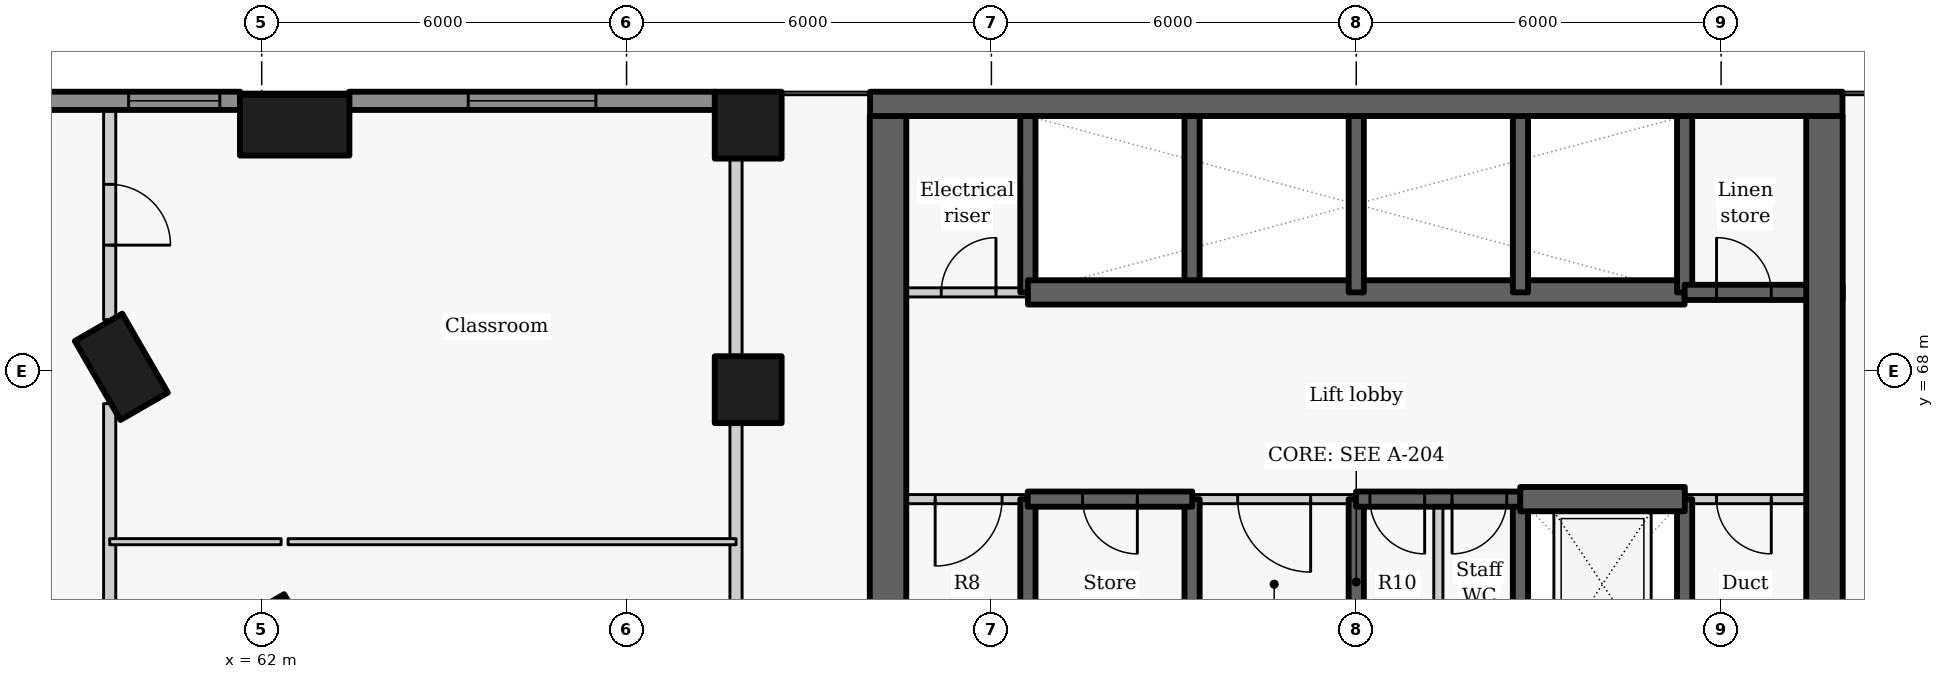
"""IFC4 building model, lengths in metres.
Left out: names, types, materials, properties, quantities, classifications, styles, units other than length and angle.
Written with IfcOpenShell. Run it as: python <this file> out.ifc"""

import sys

from ifc_helpers import new_model, si_unit, direction, frame, frame_2d, origin, origin_2d, place, context, subcontext, project, spatial, rectangle, extrude, element, fill, save


model = new_model("IFC4")
c1 = context("Model", 3, precision=1e-05, world=origin(), true_north=direction((0.0, 1.0)))
c2 = subcontext(c1, "Body", "Model", "MODEL_VIEW")
j1 = project(units=[si_unit("LENGTHUNIT", "METRE"), si_unit("PLANEANGLEUNIT", "RADIAN")], contexts=[c1])
p1 = place(None, origin())
s1 = spatial("IfcSite", under=j1, at=p1, CompositionType="ELEMENT")
p2 = place(p1, origin())
s2 = spatial("IfcBuilding", under=s1, at=p2, CompositionType="ELEMENT")
p3 = place(p2, frame((0.0, 0.0, 15.6)))
s3 = spatial("IfcBuildingStorey", under=s2, at=p3, CompositionType="ELEMENT", Elevation=15.6)
for number, where, z_axis, x_axis in (
    (1, (59.692, 68.075, 0.0), (0.0, 0.0, 1.0), (0.5, -0.866, 0.0)),
    (2, (62.354, 63.463, 0.0), (0.0, 0.0, 1.0), (0.5, -0.866, 0.0)),
):
    element("IfcColumn", number, at=place(p3, frame(where, z_axis=z_axis, x_axis=x_axis)), inside=s3, PredefinedType="COLUMN", context=c2, shape_type="SweptSolid", body=[
        extrude(rectangle(XDim=1.5, YDim=0.9, at=origin_2d()), origin(), (0.0, 0.0, 1.0), 4.2),
    ])
for number, where, z_axis, x_axis in (
    (3, (70.0, 72.05, 0.0), (0.0, 0.0, 1.0), (0.0, -1.0, 0.0)),
    (4, (70.0, 67.7, 0.0), (0.0, 0.0, 1.0), (0.0, -1.0, 0.0)),
):
    element("IfcColumn", number, at=place(p3, frame(where, z_axis=z_axis, x_axis=x_axis)), inside=s3, PredefinedType="COLUMN", context=c2, shape_type="SweptSolid", body=[
        extrude(rectangle(XDim=1.1, YDim=1.1, at=origin_2d()), origin(), (0.0, 0.0, 1.0), 4.2),
    ])
p4 = place(p3, frame((62.542, 72.05, 0.0), z_axis=(0.0, 0.0, 1.0), x_axis=(1.0, 0.0, 0.0)))
e5 = element("IfcColumn", 5, at=p4, inside=s3, PredefinedType="COLUMN", context=c2, shape_type="SweptSolid", body=[
    extrude(rectangle(XDim=1.8, YDim=1.0, at=origin_2d()), origin(), (0.0, 0.0, 1.0), 4.2),
])
p5 = place(p3, frame((69.454, 72.45, 0.0), z_axis=(0.0, 0.0, 1.0), x_axis=(-1.0, 0.0, 0.0)))
e6 = element("IfcWall", 6, at=p5, inside=s3, PredefinedType="SOLIDWALL", context=c2, shape_type="SweptSolid", body=[
    extrude(rectangle(XDim=6.016, YDim=0.3, at=frame_2d((3.008, 0.0))), origin(), (0.0, 0.0, 1.0), 3.0),
])
p6 = place(p5, frame((1.958, 0.0, 0.9)))
e7 = element("IfcOpeningElement", 7, at=p6, cuts=e6, PredefinedType="OPENING", context=c2, shape_type="SweptSolid", body=[
    extrude(rectangle(XDim=2.1, YDim=2.05, at=frame_2d((1.05, 1.025))), frame((0.0, 0.16, 0.0), z_axis=(0.0, -1.0, 0.0), x_axis=(1.0, 0.0, 0.0)), (0.0, 0.0, 1.0), 0.32),
])
p7 = place(p3, frame((61.646, 72.45, 0.0), z_axis=(0.0, 0.0, 1.0), x_axis=(-1.0, 0.0, 0.0)))
e8 = element("IfcWall", 8, at=p7, inside=s3, PredefinedType="SOLIDWALL", context=c2, shape_type="SweptSolid", body=[
    extrude(rectangle(XDim=3.973, YDim=0.3, at=frame_2d((1.986, 0.0))), origin(), (0.0, 0.0, 1.0), 3.0),
])
p8 = place(p7, frame((0.335, 0.0, 0.9)))
e9 = element("IfcOpeningElement", 9, at=p8, cuts=e8, PredefinedType="OPENING", context=c2, shape_type="SweptSolid", body=[
    extrude(rectangle(XDim=1.5, YDim=2.05, at=frame_2d((0.75, 1.025))), frame((0.0, 0.16, 0.0), z_axis=(0.0, -1.0, 0.0), x_axis=(1.0, 0.0, 0.0)), (0.0, 0.0, 1.0), 0.32),
])
p9 = place(p3, frame((74.6, 63.1, -0.3), z_axis=(0.0, 0.0, 1.0), x_axis=(0.0, 1.0, 0.0)))
e10 = element("IfcWall", 10, at=p9, inside=s3, PredefinedType="SHEAR", context=c2, shape_type="SweptSolid", body=[
    extrude(rectangle(XDim=2.8, YDim=0.25, at=frame_2d((1.4, 0.0))), origin(), (0.0, 0.0, 1.0), 4.2),
])
p10 = place(p3, frame((74.6, 69.3, -0.3), z_axis=(0.0, 0.0, 1.0), x_axis=(0.0, 1.0, 0.0)))
e11 = element("IfcWall", 11, at=p10, inside=s3, PredefinedType="SHEAR", context=c2, shape_type="SweptSolid", body=[
    extrude(rectangle(XDim=2.9, YDim=0.25, at=frame_2d((1.45, 0.0))), origin(), (0.0, 0.0, 1.0), 4.2),
])
p11 = place(p3, frame((72.0, 69.3, 0.0), z_axis=(0.0, 0.0, 1.0), x_axis=(1.0, 0.0, 0.0)))
e12 = element("IfcWall", 12, at=p11, inside=s3, PredefinedType="PARTITIONING", context=c2, shape_type="SweptSolid", body=[
    extrude(rectangle(XDim=2.6, YDim=0.15, at=frame_2d((1.3, 0.0))), origin(), (0.0, 0.0, 1.0), 3.9),
])
p12 = place(p11, frame((1.175, 0.0, 0.0)))
e13 = element("IfcOpeningElement", 13, at=p12, cuts=e12, PredefinedType="OPENING", context=c2, shape_type="SweptSolid", body=[
    extrude(rectangle(XDim=0.9, YDim=2.1, at=frame_2d((0.45, 1.05))), frame((0.0, 0.085, 0.0), z_axis=(0.0, -1.0, 0.0), x_axis=(1.0, 0.0, 0.0)), (0.0, 0.0, 1.0), 0.17),
])
p13 = place(p3, frame((72.3, 63.1, -0.3), z_axis=(0.0, 0.0, 1.0), x_axis=(0.0, 1.0, 0.0)))
e14 = element("IfcWall", 14, at=p13, inside=s3, PredefinedType="SHEAR", context=c2, shape_type="SweptSolid", body=[
    extrude(rectangle(XDim=9.1, YDim=0.6, at=frame_2d((4.55, 0.0))), origin(), (0.0, 0.0, 1.0), 4.2),
])
p14 = place(p3, frame((77.3, 63.1, -0.3), z_axis=(0.0, 0.0, 1.0), x_axis=(0.0, 1.0, 0.0)))
e15 = element("IfcWall", 15, at=p14, inside=s3, PredefinedType="SHEAR", context=c2, shape_type="SweptSolid", body=[
    extrude(rectangle(XDim=2.8, YDim=0.25, at=frame_2d((1.4, 0.0))), origin(), (0.0, 0.0, 1.0), 4.2),
])
p15 = place(p3, frame((77.3, 69.3, -0.3), z_axis=(0.0, 0.0, 1.0), x_axis=(0.0, 1.0, 0.0)))
e16 = element("IfcWall", 16, at=p15, inside=s3, PredefinedType="SHEAR", context=c2, shape_type="SweptSolid", body=[
    extrude(rectangle(XDim=2.9, YDim=0.25, at=frame_2d((1.45, 0.0))), origin(), (0.0, 0.0, 1.0), 4.2),
])
p16 = place(p3, frame((74.6, 69.3, -0.3), z_axis=(0.0, 0.0, 1.0), x_axis=(1.0, 0.0, 0.0)))
e17 = element("IfcWall", 17, at=p16, inside=s3, PredefinedType="SHEAR", context=c2, shape_type="SweptSolid", body=[
    extrude(rectangle(XDim=10.8, YDim=0.4, at=frame_2d((5.4, 0.0))), origin(), (0.0, 0.0, 1.0), 4.2),
])
p17 = place(p3, frame((80.0, 63.1, -0.3), z_axis=(0.0, 0.0, 1.0), x_axis=(0.0, 1.0, 0.0)))
e18 = element("IfcWall", 18, at=p17, inside=s3, PredefinedType="SHEAR", context=c2, shape_type="SweptSolid", body=[
    extrude(rectangle(XDim=2.8, YDim=0.25, at=frame_2d((1.4, 0.0))), origin(), (0.0, 0.0, 1.0), 4.2),
])
p18 = place(p3, frame((80.0, 69.3, -0.3), z_axis=(0.0, 0.0, 1.0), x_axis=(0.0, 1.0, 0.0)))
e19 = element("IfcWall", 19, at=p18, inside=s3, PredefinedType="SHEAR", context=c2, shape_type="SweptSolid", body=[
    extrude(rectangle(XDim=2.9, YDim=0.25, at=frame_2d((1.45, 0.0))), origin(), (0.0, 0.0, 1.0), 4.2),
])
p19 = place(p3, frame((82.7, 63.1, -0.3), z_axis=(0.0, 0.0, 1.0), x_axis=(0.0, 1.0, 0.0)))
e20 = element("IfcWall", 20, at=p19, inside=s3, PredefinedType="SHEAR", context=c2, shape_type="SweptSolid", body=[
    extrude(rectangle(XDim=2.8, YDim=0.25, at=frame_2d((1.4, 0.0))), origin(), (0.0, 0.0, 1.0), 4.2),
])
p20 = place(p3, frame((82.7, 69.3, -0.3), z_axis=(0.0, 0.0, 1.0), x_axis=(0.0, 1.0, 0.0)))
e21 = element("IfcWall", 21, at=p20, inside=s3, PredefinedType="SHEAR", context=c2, shape_type="SweptSolid", body=[
    extrude(rectangle(XDim=2.9, YDim=0.25, at=frame_2d((1.45, 0.0))), origin(), (0.0, 0.0, 1.0), 4.2),
])
p21 = place(p3, frame((85.4, 63.1, -0.3), z_axis=(0.0, 0.0, 1.0), x_axis=(0.0, 1.0, 0.0)))
e22 = element("IfcWall", 22, at=p21, inside=s3, PredefinedType="SHEAR", context=c2, shape_type="SweptSolid", body=[
    extrude(rectangle(XDim=2.8, YDim=0.25, at=frame_2d((1.4, 0.0))), origin(), (0.0, 0.0, 1.0), 4.2),
])
p22 = place(p3, frame((85.4, 69.3, -0.3), z_axis=(0.0, 0.0, 1.0), x_axis=(0.0, 1.0, 0.0)))
e23 = element("IfcWall", 23, at=p22, inside=s3, PredefinedType="SHEAR", context=c2, shape_type="SweptSolid", body=[
    extrude(rectangle(XDim=2.9, YDim=0.25, at=frame_2d((1.45, 0.0))), origin(), (0.0, 0.0, 1.0), 4.2),
])
p23 = place(p3, frame((85.4, 69.3, -0.3), z_axis=(0.0, 0.0, 1.0), x_axis=(1.0, 0.0, 0.0)))
e24 = element("IfcWall", 24, at=p23, inside=s3, PredefinedType="SHEAR", context=c2, shape_type="SweptSolid", body=[
    extrude(rectangle(XDim=2.6, YDim=0.25, at=frame_2d((1.3, 0.0))), origin(), (0.0, 0.0, 1.0), 4.2),
])
p24 = place(p23, frame((0.525, 0.0, 0.3)))
e25 = element("IfcOpeningElement", 25, at=p24, cuts=e24, PredefinedType="OPENING", context=c2, shape_type="SweptSolid", body=[
    extrude(rectangle(XDim=0.9, YDim=2.1, at=frame_2d((0.45, 1.05))), frame((0.0, 0.135, 0.0), z_axis=(0.0, -1.0, 0.0), x_axis=(1.0, 0.0, 0.0)), (0.0, 0.0, 1.0), 0.27),
])
p25 = place(p3, frame((87.7, 72.2, -0.3), z_axis=(0.0, 0.0, 1.0), x_axis=(0.0, -1.0, 0.0)))
e26 = element("IfcWall", 26, at=p25, inside=s3, PredefinedType="SHEAR", context=c2, shape_type="SweptSolid", body=[
    extrude(rectangle(XDim=15.6, YDim=0.6, at=frame_2d((7.8, 0.0))), origin(), (0.0, 0.0, 1.0), 4.2),
])
p26 = place(p25, frame((11.8, 0.0, 0.3)))
e27 = element("IfcOpeningElement", 27, at=p26, cuts=e26, PredefinedType="OPENING", context=c2, shape_type="SweptSolid", body=[
    extrude(rectangle(XDim=1.1, YDim=2.1, at=frame_2d((0.55, 1.05))), frame((0.0, 0.31, 0.0), z_axis=(0.0, -1.0, 0.0), x_axis=(1.0, 0.0, 0.0)), (0.0, 0.0, 1.0), 0.62),
])
p27 = place(p3, frame((74.603, 65.9, 0.0), z_axis=(0.0, 0.0, 1.0), x_axis=(-1.0, 0.0, 0.0)))
e28 = element("IfcWall", 28, at=p27, inside=s3, PredefinedType="PARTITIONING", context=c2, shape_type="SweptSolid", body=[
    extrude(rectangle(XDim=2.603, YDim=0.15, at=frame_2d((1.302, 0.0))), origin(), (0.0, 0.0, 1.0), 3.9),
])
p28 = place(p27, frame((0.428, 0.0, 0.0)))
e29 = element("IfcOpeningElement", 29, at=p28, cuts=e28, PredefinedType="OPENING", context=c2, shape_type="SweptSolid", body=[
    extrude(rectangle(XDim=1.1, YDim=2.1, at=frame_2d((0.55, 1.05))), frame((0.0, 0.085, 0.0), z_axis=(0.0, -1.0, 0.0), x_axis=(1.0, 0.0, 0.0)), (0.0, 0.0, 1.0), 0.17),
])
p29 = place(p3, frame((80.003, 65.9, 0.0), z_axis=(0.0, 0.0, 1.0), x_axis=(-1.0, 0.0, 0.0)))
e30 = element("IfcWall", 30, at=p29, inside=s3, PredefinedType="PARTITIONING", context=c2, shape_type="SweptSolid", body=[
    extrude(rectangle(XDim=2.706, YDim=0.15, at=frame_2d((1.353, 0.0))), origin(), (0.0, 0.0, 1.0), 3.9),
])
p30 = place(p29, frame((0.753, 0.0, 0.0)))
e31 = element("IfcOpeningElement", 31, at=p30, cuts=e30, PredefinedType="OPENING", context=c2, shape_type="SweptSolid", body=[
    extrude(rectangle(XDim=1.2, YDim=2.1, at=frame_2d((0.6, 1.05))), frame((0.0, 0.085, 0.0), z_axis=(0.0, -1.0, 0.0), x_axis=(1.0, 0.0, 0.0)), (0.0, 0.0, 1.0), 0.17),
])
p31 = place(p3, frame((88.0, 65.9, 0.0), z_axis=(0.0, 0.0, 1.0), x_axis=(-1.0, 0.0, 0.0)))
e32 = element("IfcWall", 32, at=p31, inside=s3, PredefinedType="PARTITIONING", context=c2, shape_type="SweptSolid", body=[
    extrude(rectangle(XDim=2.603, YDim=0.15, at=frame_2d((1.302, 0.0))), origin(), (0.0, 0.0, 1.0), 3.9),
])
p32 = place(p31, frame((1.175, 0.0, 0.0)))
e33 = element("IfcOpeningElement", 33, at=p32, cuts=e32, PredefinedType="OPENING", context=c2, shape_type="SweptSolid", body=[
    extrude(rectangle(XDim=0.9, YDim=2.1, at=frame_2d((0.45, 1.05))), frame((0.0, 0.085, 0.0), z_axis=(0.0, -1.0, 0.0), x_axis=(1.0, 0.0, 0.0)), (0.0, 0.0, 1.0), 0.17),
])
p33 = place(p3, frame((77.303, 65.9, -0.3), z_axis=(0.0, 0.0, 1.0), x_axis=(-1.0, 0.0, 0.0)))
e34 = element("IfcWall", 34, at=p33, inside=s3, PredefinedType="SHEAR", context=c2, shape_type="SweptSolid", body=[
    extrude(rectangle(XDim=2.706, YDim=0.25, at=frame_2d((1.353, 0.0))), origin(), (0.0, 0.0, 1.0), 4.2),
])
p34 = place(p33, frame((0.903, 0.0, 0.3)))
e35 = element("IfcOpeningElement", 35, at=p34, cuts=e34, PredefinedType="OPENING", context=c2, shape_type="SweptSolid", body=[
    extrude(rectangle(XDim=0.9, YDim=2.1, at=frame_2d((0.45, 1.05))), frame((0.0, 0.135, 0.0), z_axis=(0.0, -1.0, 0.0), x_axis=(1.0, 0.0, 0.0)), (0.0, 0.0, 1.0), 0.27),
])
p35 = place(p3, frame((82.703, 65.9, -0.3), z_axis=(0.0, 0.0, 1.0), x_axis=(-1.0, 0.0, 0.0)))
e36 = element("IfcWall", 36, at=p35, inside=s3, PredefinedType="SHEAR", context=c2, shape_type="SweptSolid", body=[
    extrude(rectangle(XDim=2.706, YDim=0.25, at=frame_2d((1.353, 0.0))), origin(), (0.0, 0.0, 1.0), 4.2),
])
p36 = place(p35, frame((1.578, 0.0, 0.3)))
e37 = element("IfcOpeningElement", 37, at=p36, cuts=e36, PredefinedType="OPENING", context=c2, shape_type="SweptSolid", body=[
    extrude(rectangle(XDim=0.9, YDim=2.1, at=frame_2d((0.45, 1.05))), frame((0.0, 0.135, 0.0), z_axis=(0.0, -1.0, 0.0), x_axis=(1.0, 0.0, 0.0)), (0.0, 0.0, 1.0), 0.27),
])
p37 = place(p35, frame((0.228, 0.0, 0.3)))
e38 = element("IfcOpeningElement", 38, at=p37, cuts=e36, PredefinedType="OPENING", context=c2, shape_type="SweptSolid", body=[
    extrude(rectangle(XDim=0.9, YDim=2.1, at=frame_2d((0.45, 1.05))), frame((0.0, 0.135, 0.0), z_axis=(0.0, -1.0, 0.0), x_axis=(1.0, 0.0, 0.0)), (0.0, 0.0, 1.0), 0.27),
])
p38 = place(p3, frame((82.697, 65.9, -0.3), z_axis=(0.0, 0.0, 1.0), x_axis=(1.0, 0.0, 0.0)))
e39 = element("IfcWall", 39, at=p38, inside=s3, PredefinedType="SHEAR", context=c2, shape_type="SweptSolid", body=[
    extrude(rectangle(XDim=2.706, YDim=0.4, at=frame_2d((1.353, 0.0))), origin(), (0.0, 0.0, 1.0), 4.2),
])
p39 = place(p3, frame((81.35, 63.1, 0.0), z_axis=(0.0, 0.0, 1.0), x_axis=(0.0, 1.0, 0.0)))
e40 = element("IfcWall", 40, at=p39, inside=s3, PredefinedType="PARTITIONING", context=c2, shape_type="SweptSolid", body=[
    extrude(rectangle(XDim=2.8, YDim=0.15, at=frame_2d((1.4, 0.0))), origin(), (0.0, 0.0, 1.0), 3.9),
])
p40 = place(p3, frame((59.5, 67.47, 0.0), z_axis=(0.0, 0.0, 1.0), x_axis=(0.0, -1.0, 0.0)))
e41 = element("IfcWall", 41, at=p40, inside=s3, PredefinedType="PARTITIONING", context=c2, shape_type="SweptSolid", body=[
    extrude(rectangle(XDim=10.873, YDim=0.2, at=frame_2d((5.437, 0.0))), origin(), (0.0, 0.0, 1.0), 3.9),
])
p41 = place(p40, frame((4.87, 0.0, 0.0)))
e42 = element("IfcOpeningElement", 42, at=p41, cuts=e41, PredefinedType="OPENING", context=c2, shape_type="SweptSolid", body=[
    extrude(rectangle(XDim=1.0, YDim=2.1, at=frame_2d((0.5, 1.05))), frame((0.0, 0.11, 0.0), z_axis=(0.0, -1.0, 0.0), x_axis=(1.0, 0.0, 0.0)), (0.0, 0.0, 1.0), 0.22),
])
p42 = place(p40, frame((9.17, 0.0, 0.0)))
e43 = element("IfcOpeningElement", 43, at=p42, cuts=e41, PredefinedType="OPENING", context=c2, shape_type="SweptSolid", body=[
    extrude(rectangle(XDim=1.0, YDim=2.1, at=frame_2d((0.5, 1.05))), frame((0.0, 0.11, 0.0), z_axis=(0.0, -1.0, 0.0), x_axis=(1.0, 0.0, 0.0)), (0.0, 0.0, 1.0), 0.22),
])
p43 = place(p3, frame((59.5, 72.3, 0.0), z_axis=(0.0, 0.0, 1.0), x_axis=(0.0, -1.0, 0.0)))
e44 = element("IfcWall", 44, at=p43, inside=s3, PredefinedType="PARTITIONING", context=c2, shape_type="SweptSolid", body=[
    extrude(rectangle(XDim=3.449, YDim=0.2, at=frame_2d((1.725, 0.0))), origin(), (0.0, 0.0, 1.0), 3.13),
])
p44 = place(p43, frame((1.223, 0.0, 0.0)))
e45 = element("IfcOpeningElement", 45, at=p44, cuts=e44, PredefinedType="OPENING", context=c2, shape_type="SweptSolid", body=[
    extrude(rectangle(XDim=1.0, YDim=2.1, at=frame_2d((0.5, 1.05))), frame((0.0, 0.11, 0.0), z_axis=(0.0, -1.0, 0.0), x_axis=(1.0, 0.0, 0.0)), (0.0, 0.0, 1.0), 0.22),
])
p45 = place(p3, frame((69.8, 63.917, 0.0), z_axis=(0.0, 0.0, 1.0), x_axis=(0.0, 1.0, 0.0)))
e46 = element("IfcWall", 46, at=p45, inside=s3, PredefinedType="PARTITIONING", context=c2, shape_type="SweptSolid", body=[
    extrude(rectangle(XDim=3.216, YDim=0.2, at=frame_2d((1.608, 0.0))), origin(), (0.0, 0.0, 1.0), 3.13),
])
p46 = place(p3, frame((69.8, 68.267, 0.0), z_axis=(0.0, 0.0, 1.0), x_axis=(0.0, 1.0, 0.0)))
e47 = element("IfcWall", 47, at=p46, inside=s3, PredefinedType="PARTITIONING", context=c2, shape_type="SweptSolid", body=[
    extrude(rectangle(XDim=3.216, YDim=0.2, at=frame_2d((1.608, 0.0))), origin(), (0.0, 0.0, 1.0), 3.13),
])
p47 = place(p3, frame((59.5, 65.2, 0.0), z_axis=(0.0, 0.0, 1.0), x_axis=(1.0, 0.0, 0.0)))
e48 = element("IfcWall", 48, at=p47, inside=s3, PredefinedType="PARTITIONING", context=c2, shape_type="SweptSolid", body=[
    extrude(rectangle(XDim=2.82, YDim=0.1, at=frame_2d((1.41, 0.0))), origin(), (0.0, 0.0, 1.0), 2.98),
])
p48 = place(p3, frame((62.434, 65.2, 0.0), z_axis=(0.0, 0.0, 1.0), x_axis=(1.0, 0.0, 0.0)))
e49 = element("IfcWall", 49, at=p48, inside=s3, PredefinedType="PARTITIONING", context=c2, shape_type="SweptSolid", body=[
    extrude(rectangle(XDim=7.366, YDim=0.1, at=frame_2d((3.683, 0.0))), origin(), (0.0, 0.0, 1.0), 3.9),
])
p49 = place(p3, frame((72.004, 72.4, -0.3), z_axis=(0.0, 0.0, 1.0), x_axis=(1.0, 0.0, 0.0)))
e50 = element("IfcWall", 50, at=p49, inside=s3, PredefinedType="SHEAR", context=c2, shape_type="SweptSolid", body=[
    extrude(rectangle(XDim=15.992, YDim=0.4, at=frame_2d((7.996, 0.0))), origin(), (0.0, 0.0, 1.0), 4.2),
])
p50 = place(p6, origin())
e51 = element("IfcWindow", 51, at=p50, inside=s3, PartitioningType="SINGLE_PANEL", PredefinedType="WINDOW", context=c2, shape_type="SweptSolid", body=[
    extrude(rectangle(XDim=2.1, YDim=2.05, at=frame_2d((1.05, 1.025))), frame((0.0, 0.03, 0.0), z_axis=(0.0, -1.0, 0.0), x_axis=(1.0, 0.0, 0.0)), (0.0, 0.0, 1.0), 0.06),
])
fill(e7, e51)
p51 = place(p8, origin())
e52 = element("IfcWindow", 52, at=p51, inside=s3, PartitioningType="SINGLE_PANEL", PredefinedType="WINDOW", context=c2, shape_type="SweptSolid", body=[
    extrude(rectangle(XDim=1.5, YDim=2.05, at=frame_2d((0.75, 1.025))), frame((0.0, 0.03, 0.0), z_axis=(0.0, -1.0, 0.0), x_axis=(1.0, 0.0, 0.0)), (0.0, 0.0, 1.0), 0.06),
])
fill(e9, e52)
p52 = place(p12, origin())
e53 = element("IfcDoor", 53, at=p52, inside=s3, OperationType="SINGLE_SWING_RIGHT", PredefinedType="DOOR", context=c2, shape_type="SweptSolid", body=[
    extrude(rectangle(XDim=0.9, YDim=2.1, at=frame_2d((0.45, 1.05))), frame((0.0, 0.025, 0.0), z_axis=(0.0, -1.0, 0.0), x_axis=(1.0, 0.0, 0.0)), (0.0, 0.0, 1.0), 0.05),
])
fill(e13, e53)
p53 = place(p24, origin())
e54 = element("IfcDoor", 54, at=p53, inside=s3, OperationType="SINGLE_SWING_LEFT", PredefinedType="DOOR", context=c2, shape_type="SweptSolid", body=[
    extrude(rectangle(XDim=0.9, YDim=2.1, at=frame_2d((0.45, 1.05))), frame((0.0, 0.025, 0.0), z_axis=(0.0, -1.0, 0.0), x_axis=(1.0, 0.0, 0.0)), (0.0, 0.0, 1.0), 0.05),
])
fill(e25, e54)
p54 = place(p28, origin())
e55 = element("IfcDoor", 55, at=p54, inside=s3, OperationType="SINGLE_SWING_RIGHT", PredefinedType="DOOR", context=c2, shape_type="SweptSolid", body=[
    extrude(rectangle(XDim=1.1, YDim=2.1, at=frame_2d((0.55, 1.05))), frame((0.0, 0.025, 0.0), z_axis=(0.0, -1.0, 0.0), x_axis=(1.0, 0.0, 0.0)), (0.0, 0.0, 1.0), 0.05),
])
fill(e29, e55)
p55 = place(p34, origin())
e56 = element("IfcDoor", 56, at=p55, inside=s3, OperationType="SINGLE_SWING_LEFT", PredefinedType="DOOR", context=c2, shape_type="SweptSolid", body=[
    extrude(rectangle(XDim=0.9, YDim=2.1, at=frame_2d((0.45, 1.05))), frame((0.0, 0.025, 0.0), z_axis=(0.0, -1.0, 0.0), x_axis=(1.0, 0.0, 0.0)), (0.0, 0.0, 1.0), 0.05),
])
fill(e35, e56)
p56 = place(p30, origin())
e57 = element("IfcDoor", 57, at=p56, inside=s3, OperationType="DOUBLE_DOOR_SINGLE_SWING", PredefinedType="DOOR", context=c2, shape_type="SweptSolid", body=[
    extrude(rectangle(XDim=1.2, YDim=2.1, at=frame_2d((0.6, 1.05))), frame((0.0, 0.025, 0.0), z_axis=(0.0, -1.0, 0.0), x_axis=(1.0, 0.0, 0.0)), (0.0, 0.0, 1.0), 0.05),
])
fill(e31, e57)
p57 = place(p36, origin())
e58 = element("IfcDoor", 58, at=p57, inside=s3, OperationType="SINGLE_SWING_LEFT", PredefinedType="DOOR", context=c2, shape_type="SweptSolid", body=[
    extrude(rectangle(XDim=0.9, YDim=2.1, at=frame_2d((0.45, 1.05))), frame((0.0, 0.025, 0.0), z_axis=(0.0, -1.0, 0.0), x_axis=(1.0, 0.0, 0.0)), (0.0, 0.0, 1.0), 0.05),
])
fill(e37, e58)
p58 = place(p37, origin())
e59 = element("IfcDoor", 59, at=p58, inside=s3, OperationType="SINGLE_SWING_RIGHT", PredefinedType="DOOR", context=c2, shape_type="SweptSolid", body=[
    extrude(rectangle(XDim=0.9, YDim=2.1, at=frame_2d((0.45, 1.05))), frame((0.0, 0.025, 0.0), z_axis=(0.0, -1.0, 0.0), x_axis=(1.0, 0.0, 0.0)), (0.0, 0.0, 1.0), 0.05),
])
fill(e38, e59)
p59 = place(p32, origin())
e60 = element("IfcDoor", 60, at=p59, inside=s3, OperationType="SINGLE_SWING_LEFT", PredefinedType="DOOR", context=c2, shape_type="SweptSolid", body=[
    extrude(rectangle(XDim=0.9, YDim=2.1, at=frame_2d((0.45, 1.05))), frame((0.0, 0.025, 0.0), z_axis=(0.0, -1.0, 0.0), x_axis=(1.0, 0.0, 0.0)), (0.0, 0.0, 1.0), 0.05),
])
fill(e33, e60)
p60 = place(p44, origin())
e61 = element("IfcDoor", 61, at=p60, inside=s3, OperationType="SINGLE_SWING_RIGHT", PredefinedType="DOOR", context=c2, shape_type="SweptSolid", body=[
    extrude(rectangle(XDim=1.0, YDim=2.1, at=frame_2d((0.5, 1.05))), frame((0.0, 0.025, 0.0), z_axis=(0.0, -1.0, 0.0), x_axis=(1.0, 0.0, 0.0)), (0.0, 0.0, 1.0), 0.05),
])
fill(e45, e61)
save(model, sys.argv[1])
